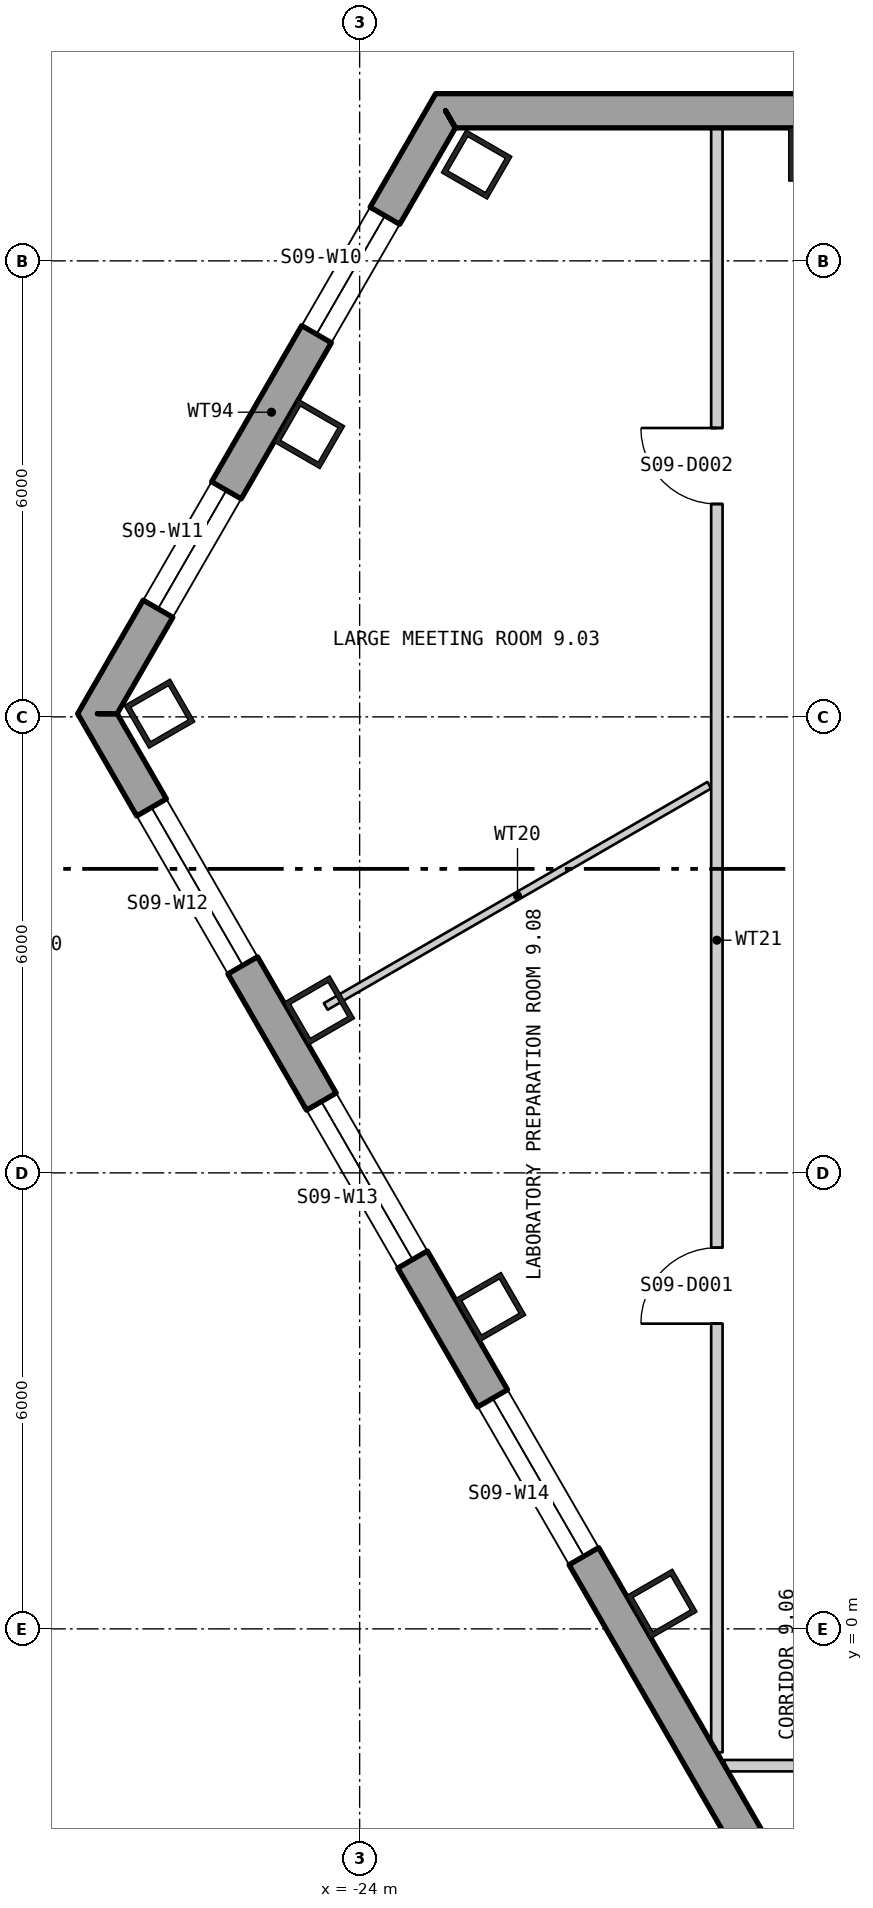
"""IFC4 building model, lengths in metres.
Left out: names, types, materials, properties, quantities, classifications, styles, units other than length and angle.
Written with IfcOpenShell. Run it as: python <this file> out.ifc"""

import sys

from ifc_helpers import new_model, si_unit, direction, frame, frame_2d, origin, origin_2d, place, context, subcontext, project, spatial, polyline, rectangle, hollow_rectangle, outline, extrude, element, fill, save


model = new_model("IFC4")
c1 = context("Model", 3, precision=1e-05, world=origin(), true_north=direction((0.0, 1.0)))
c2 = subcontext(c1, "Body", "Model", "MODEL_VIEW")
j1 = project(units=[si_unit("LENGTHUNIT", "METRE"), si_unit("PLANEANGLEUNIT", "RADIAN")], contexts=[c1])
p1 = place(None, origin())
s1 = spatial("IfcSite", under=j1, at=p1, CompositionType="ELEMENT")
p2 = place(p1, origin())
s2 = spatial("IfcBuilding", under=s1, at=p2, CompositionType="ELEMENT")
p3 = place(p2, frame((0.0, 0.0, 124.8)))
s3 = spatial("IfcBuildingStorey", under=s2, at=p3, CompositionType="ELEMENT", Elevation=124.8)
for number, where, z_axis, x_axis in (
    (1, (-18.03, 19.4, 0.0), (0.0, 0.0, 1.0), (-1.0, 0.0, 0.0)),
    (2, (-22.461, 19.267, 0.0), (0.0, 0.0, 1.0), (-0.5, -0.866, 0.0)),
    (3, (-24.662, 15.721, 0.0), (0.0, 0.0, 1.0), (-0.5, -0.866, 0.0)),
    (4, (-26.633, 12.042, 0.0), (0.0, 0.0, 1.0), (0.5, -0.866, 0.0)),
    (5, (-24.532, 8.138, 0.0), (0.0, 0.0, 1.0), (0.5, -0.866, 0.0)),
    (6, (-22.279, 4.235, 0.0), (0.0, 0.0, 1.0), (0.5, -0.866, 0.0)),
    (7, (-20.025, 0.331, 0.0), (0.0, 0.0, 1.0), (0.5, -0.866, 0.0)),
):
    element("IfcColumn", number, at=place(p3, frame(where, z_axis=z_axis, x_axis=x_axis)), inside=s3, PredefinedType="COLUMN", context=c2, shape_type="SweptSolid", body=[
        extrude(hollow_rectangle(XDim=0.65, YDim=0.7, WallThickness=0.065, at=origin_2d()), origin(), (0.0, 0.0, 1.0), 4.5),
    ])
p4 = place(p3, frame((22.87, 19.975, -0.4), z_axis=(0.0, 0.0, 1.0), x_axis=(-1.0, 0.0, 0.0)))
e8 = element("IfcWall", 8, at=p4, inside=s3, PredefinedType="SOLIDWALL", context=c2, shape_type="SweptSolid", body=[
    extrude(outline(polyline([(-0.13, -0.225), (45.87, -0.225), (45.61, 0.225), (0.13, 0.225), (-0.13, -0.225)])), origin(), (0.0, 0.0, 1.0), 4.5),
])
p5 = place(p4, frame((1.424, 0.0, 1.3)))
e9 = element("IfcOpeningElement", 9, at=p5, cuts=e8, PredefinedType="OPENING", context=c2, shape_type="SweptSolid", body=[
    extrude(rectangle(XDim=2.4, YDim=2.6, at=frame_2d((1.2, 1.3))), frame((0.0, 0.235, 0.0), z_axis=(0.0, -1.0, 0.0), x_axis=(1.0, 0.0, 0.0)), (0.0, 0.0, 1.0), 0.47),
])
p6 = place(p4, frame((5.893, 0.0, 1.3)))
e10 = element("IfcOpeningElement", 10, at=p6, cuts=e8, PredefinedType="OPENING", context=c2, shape_type="SweptSolid", body=[
    extrude(rectangle(XDim=2.4, YDim=2.6, at=frame_2d((1.2, 1.3))), frame((0.0, 0.235, 0.0), z_axis=(0.0, -1.0, 0.0), x_axis=(1.0, 0.0, 0.0)), (0.0, 0.0, 1.0), 0.47),
])
p7 = place(p4, frame((10.401, 0.0, 1.3)))
e11 = element("IfcOpeningElement", 11, at=p7, cuts=e8, PredefinedType="OPENING", context=c2, shape_type="SweptSolid", body=[
    extrude(rectangle(XDim=2.4, YDim=2.6, at=frame_2d((1.2, 1.3))), frame((0.0, 0.235, 0.0), z_axis=(0.0, -1.0, 0.0), x_axis=(1.0, 0.0, 0.0)), (0.0, 0.0, 1.0), 0.47),
])
p8 = place(p4, frame((14.909, 0.0, 1.3)))
e12 = element("IfcOpeningElement", 12, at=p8, cuts=e8, PredefinedType="OPENING", context=c2, shape_type="SweptSolid", body=[
    extrude(rectangle(XDim=2.4, YDim=2.6, at=frame_2d((1.2, 1.3))), frame((0.0, 0.235, 0.0), z_axis=(0.0, -1.0, 0.0), x_axis=(1.0, 0.0, 0.0)), (0.0, 0.0, 1.0), 0.47),
])
p9 = place(p4, frame((19.416, 0.0, 1.3)))
e13 = element("IfcOpeningElement", 13, at=p9, cuts=e8, PredefinedType="OPENING", context=c2, shape_type="SweptSolid", body=[
    extrude(rectangle(XDim=2.4, YDim=2.6, at=frame_2d((1.2, 1.3))), frame((0.0, 0.235, 0.0), z_axis=(0.0, -1.0, 0.0), x_axis=(1.0, 0.0, 0.0)), (0.0, 0.0, 1.0), 0.47),
])
p10 = place(p4, frame((23.924, 0.0, 1.3)))
e14 = element("IfcOpeningElement", 14, at=p10, cuts=e8, PredefinedType="OPENING", context=c2, shape_type="SweptSolid", body=[
    extrude(rectangle(XDim=2.4, YDim=2.6, at=frame_2d((1.2, 1.3))), frame((0.0, 0.235, 0.0), z_axis=(0.0, -1.0, 0.0), x_axis=(1.0, 0.0, 0.0)), (0.0, 0.0, 1.0), 0.47),
])
p11 = place(p4, frame((28.431, 0.0, 1.3)))
e15 = element("IfcOpeningElement", 15, at=p11, cuts=e8, PredefinedType="OPENING", context=c2, shape_type="SweptSolid", body=[
    extrude(rectangle(XDim=2.4, YDim=2.6, at=frame_2d((1.2, 1.3))), frame((0.0, 0.235, 0.0), z_axis=(0.0, -1.0, 0.0), x_axis=(1.0, 0.0, 0.0)), (0.0, 0.0, 1.0), 0.47),
])
p12 = place(p4, frame((32.939, 0.0, 1.3)))
e16 = element("IfcOpeningElement", 16, at=p12, cuts=e8, PredefinedType="OPENING", context=c2, shape_type="SweptSolid", body=[
    extrude(rectangle(XDim=2.4, YDim=2.6, at=frame_2d((1.2, 1.3))), frame((0.0, 0.235, 0.0), z_axis=(0.0, -1.0, 0.0), x_axis=(1.0, 0.0, 0.0)), (0.0, 0.0, 1.0), 0.47),
])
p13 = place(p4, frame((37.447, 0.0, 1.3)))
e17 = element("IfcOpeningElement", 17, at=p13, cuts=e8, PredefinedType="OPENING", context=c2, shape_type="SweptSolid", body=[
    extrude(rectangle(XDim=2.4, YDim=2.6, at=frame_2d((1.2, 1.3))), frame((0.0, 0.235, 0.0), z_axis=(0.0, -1.0, 0.0), x_axis=(1.0, 0.0, 0.0)), (0.0, 0.0, 1.0), 0.47),
])
p14 = place(p3, frame((-22.87, 19.975, -0.4), z_axis=(0.0, 0.0, 1.0), x_axis=(-0.499998388237, -0.866026334334, 0.0)))
e18 = element("IfcWall", 18, at=p14, inside=s3, PredefinedType="SOLIDWALL", context=c2, shape_type="SweptSolid", body=[
    extrude(outline(polyline([(-0.13, -0.225), (9.29, -0.225), (9.03, 0.225), (0.13, 0.225), (-0.13, -0.225)])), origin(), (0.0, 0.0, 1.0), 4.5),
])
p15 = place(p14, frame((1.594, 0.0, 1.3)))
e19 = element("IfcOpeningElement", 19, at=p15, cuts=e18, PredefinedType="OPENING", context=c2, shape_type="SweptSolid", body=[
    extrude(rectangle(XDim=1.8, YDim=2.6, at=frame_2d((0.9, 1.3))), frame((0.0, 0.235, 0.0), z_axis=(0.0, -1.0, 0.0), x_axis=(1.0, 0.0, 0.0)), (0.0, 0.0, 1.0), 0.47),
])
p16 = place(p14, frame((5.766, 0.0, 1.3)))
e20 = element("IfcOpeningElement", 20, at=p16, cuts=e18, PredefinedType="OPENING", context=c2, shape_type="SweptSolid", body=[
    extrude(rectangle(XDim=1.8, YDim=2.6, at=frame_2d((0.9, 1.3))), frame((0.0, 0.235, 0.0), z_axis=(0.0, -1.0, 0.0), x_axis=(1.0, 0.0, 0.0)), (0.0, 0.0, 1.0), 0.47),
])
p17 = place(p3, frame((-27.45, 12.042, -0.18), z_axis=(0.0, 0.0, 1.0), x_axis=(0.500000711659, -0.866024992908, 0.0)))
e21 = element("IfcWall", 21, at=p17, inside=s3, PredefinedType="SOLIDWALL", context=c2, shape_type="SweptSolid", body=[
    extrude(outline(polyline([(-0.13, -0.225), (45.87, -0.225), (45.61, 0.225), (0.13, 0.225), (-0.13, -0.225)])), origin(), (0.0, 0.0, 1.0), 4.28),
])
p18 = place(p17, frame((1.424, 0.0, 1.08)))
e22 = element("IfcOpeningElement", 22, at=p18, cuts=e21, PredefinedType="OPENING", context=c2, shape_type="SweptSolid", body=[
    extrude(rectangle(XDim=2.4, YDim=2.6, at=frame_2d((1.2, 1.3))), frame((0.0, 0.235, 0.0), z_axis=(0.0, -1.0, 0.0), x_axis=(1.0, 0.0, 0.0)), (0.0, 0.0, 1.0), 0.47),
])
p19 = place(p17, frame((5.893, 0.0, 1.08)))
e23 = element("IfcOpeningElement", 23, at=p19, cuts=e21, PredefinedType="OPENING", context=c2, shape_type="SweptSolid", body=[
    extrude(rectangle(XDim=2.4, YDim=2.6, at=frame_2d((1.2, 1.3))), frame((0.0, 0.235, 0.0), z_axis=(0.0, -1.0, 0.0), x_axis=(1.0, 0.0, 0.0)), (0.0, 0.0, 1.0), 0.47),
])
p20 = place(p17, frame((10.401, 0.0, 1.08)))
e24 = element("IfcOpeningElement", 24, at=p20, cuts=e21, PredefinedType="OPENING", context=c2, shape_type="SweptSolid", body=[
    extrude(rectangle(XDim=2.4, YDim=2.6, at=frame_2d((1.2, 1.3))), frame((0.0, 0.235, 0.0), z_axis=(0.0, -1.0, 0.0), x_axis=(1.0, 0.0, 0.0)), (0.0, 0.0, 1.0), 0.47),
])
p21 = place(p17, frame((19.416, 0.0, 1.08)))
e25 = element("IfcOpeningElement", 25, at=p21, cuts=e21, PredefinedType="OPENING", context=c2, shape_type="SweptSolid", body=[
    extrude(rectangle(XDim=2.4, YDim=2.6, at=frame_2d((1.2, 1.3))), frame((0.0, 0.235, 0.0), z_axis=(0.0, -1.0, 0.0), x_axis=(1.0, 0.0, 0.0)), (0.0, 0.0, 1.0), 0.47),
])
p22 = place(p17, frame((23.924, 0.0, 1.08)))
e26 = element("IfcOpeningElement", 26, at=p22, cuts=e21, PredefinedType="OPENING", context=c2, shape_type="SweptSolid", body=[
    extrude(rectangle(XDim=2.4, YDim=2.6, at=frame_2d((1.2, 1.3))), frame((0.0, 0.235, 0.0), z_axis=(0.0, -1.0, 0.0), x_axis=(1.0, 0.0, 0.0)), (0.0, 0.0, 1.0), 0.47),
])
p23 = place(p17, frame((28.431, 0.0, 1.08)))
e27 = element("IfcOpeningElement", 27, at=p23, cuts=e21, PredefinedType="OPENING", context=c2, shape_type="SweptSolid", body=[
    extrude(rectangle(XDim=2.4, YDim=2.6, at=frame_2d((1.2, 1.3))), frame((0.0, 0.235, 0.0), z_axis=(0.0, -1.0, 0.0), x_axis=(1.0, 0.0, 0.0)), (0.0, 0.0, 1.0), 0.47),
])
p24 = place(p17, frame((32.939, 0.0, 1.08)))
e28 = element("IfcOpeningElement", 28, at=p24, cuts=e21, PredefinedType="OPENING", context=c2, shape_type="SweptSolid", body=[
    extrude(rectangle(XDim=2.4, YDim=2.6, at=frame_2d((1.2, 1.3))), frame((0.0, 0.235, 0.0), z_axis=(0.0, -1.0, 0.0), x_axis=(1.0, 0.0, 0.0)), (0.0, 0.0, 1.0), 0.47),
])
p25 = place(p17, frame((37.447, 0.0, 1.08)))
e29 = element("IfcOpeningElement", 29, at=p25, cuts=e21, PredefinedType="OPENING", context=c2, shape_type="SweptSolid", body=[
    extrude(rectangle(XDim=2.4, YDim=2.6, at=frame_2d((1.2, 1.3))), frame((0.0, 0.235, 0.0), z_axis=(0.0, -1.0, 0.0), x_axis=(1.0, 0.0, 0.0)), (0.0, 0.0, 1.0), 0.47),
])
p26 = place(p17, frame((41.916, 0.0, 1.08)))
e30 = element("IfcOpeningElement", 30, at=p26, cuts=e21, PredefinedType="OPENING", context=c2, shape_type="SweptSolid", body=[
    extrude(rectangle(XDim=2.4, YDim=2.6, at=frame_2d((1.2, 1.3))), frame((0.0, 0.235, 0.0), z_axis=(0.0, -1.0, 0.0), x_axis=(1.0, 0.0, 0.0)), (0.0, 0.0, 1.0), 0.47),
])
p27 = place(p3, frame((-24.446, 8.189, 0.0), z_axis=(0.0, 0.0, 1.0), x_axis=(0.866122712398, 0.499831418649, 0.0)))
e31 = element("IfcWall", 31, at=p27, inside=s3, PredefinedType="PARTITIONING", context=c2, shape_type="SweptSolid", body=[
    extrude(rectangle(XDim=5.826, YDim=0.1, at=frame_2d((2.913, 0.0))), origin(), (0.0, 0.0, 1.0), 4.3),
])
p28 = place(p3, frame((-19.3, -1.624, 0.0), z_axis=(0.0, 0.0, 1.0), x_axis=(0.0, 1.0, 0.0)))
e32 = element("IfcWall", 32, at=p28, inside=s3, PredefinedType="PARTITIONING", context=c2, shape_type="SweptSolid", body=[
    extrude(rectangle(XDim=21.371, YDim=0.15, at=frame_2d((10.685, 0.0))), origin(), (0.0, 0.0, 1.0), 4.3),
])
p29 = place(p28, frame((5.64, 0.0, 0.0)))
e33 = element("IfcOpeningElement", 33, at=p29, cuts=e32, PredefinedType="OPENING", context=c2, shape_type="SweptSolid", body=[
    extrude(rectangle(XDim=1.0, YDim=2.1, at=frame_2d((0.5, 1.05))), frame((0.0, 0.085, 0.0), z_axis=(0.0, -1.0, 0.0), x_axis=(1.0, 0.0, 0.0)), (0.0, 0.0, 1.0), 0.17),
])
p30 = place(p28, frame((16.425, 0.0, 0.0)))
e34 = element("IfcOpeningElement", 34, at=p30, cuts=e32, PredefinedType="OPENING", context=c2, shape_type="SweptSolid", body=[
    extrude(rectangle(XDim=1.0, YDim=2.1, at=frame_2d((0.5, 1.05))), frame((0.0, 0.085, 0.0), z_axis=(0.0, -1.0, 0.0), x_axis=(1.0, 0.0, 0.0)), (0.0, 0.0, 1.0), 0.17),
])
p31 = place(p3, frame((-19.198, -1.8, 0.0), z_axis=(0.0, 0.0, 1.0), x_axis=(1.0, 0.0, 0.0)))
e35 = element("IfcWall", 35, at=p31, inside=s3, PredefinedType="PARTITIONING", context=c2, shape_type="SweptSolid", body=[
    extrude(rectangle(XDim=11.838, YDim=0.15, at=frame_2d((5.919, 0.0))), origin(), (0.0, 0.0, 1.0), 4.3),
])
p32 = place(p15, origin())
e36 = element("IfcWindow", 36, at=p32, inside=s3, PartitioningType="SINGLE_PANEL", PredefinedType="WINDOW", context=c2, shape_type="SweptSolid", body=[
    extrude(rectangle(XDim=1.8, YDim=2.6, at=frame_2d((0.9, 1.3))), frame((0.0, 0.105, 0.0), z_axis=(0.0, -1.0, 0.0), x_axis=(1.0, 0.0, 0.0)), (0.0, 0.0, 1.0), 0.06),
])
fill(e19, e36)
p33 = place(p16, origin())
e37 = element("IfcWindow", 37, at=p33, inside=s3, PartitioningType="SINGLE_PANEL", PredefinedType="WINDOW", context=c2, shape_type="SweptSolid", body=[
    extrude(rectangle(XDim=1.8, YDim=2.6, at=frame_2d((0.9, 1.3))), frame((0.0, 0.105, 0.0), z_axis=(0.0, -1.0, 0.0), x_axis=(1.0, 0.0, 0.0)), (0.0, 0.0, 1.0), 0.06),
])
fill(e20, e37)
p34 = place(p18, origin())
e38 = element("IfcWindow", 38, at=p34, inside=s3, PartitioningType="SINGLE_PANEL", PredefinedType="WINDOW", context=c2, shape_type="SweptSolid", body=[
    extrude(rectangle(XDim=2.4, YDim=2.6, at=frame_2d((1.2, 1.3))), frame((0.0, 0.105, 0.0), z_axis=(0.0, -1.0, 0.0), x_axis=(1.0, 0.0, 0.0)), (0.0, 0.0, 1.0), 0.06),
])
fill(e22, e38)
p35 = place(p19, origin())
e39 = element("IfcWindow", 39, at=p35, inside=s3, PartitioningType="SINGLE_PANEL", PredefinedType="WINDOW", context=c2, shape_type="SweptSolid", body=[
    extrude(rectangle(XDim=2.4, YDim=2.6, at=frame_2d((1.2, 1.3))), frame((0.0, 0.105, 0.0), z_axis=(0.0, -1.0, 0.0), x_axis=(1.0, 0.0, 0.0)), (0.0, 0.0, 1.0), 0.06),
])
fill(e23, e39)
p36 = place(p20, origin())
e40 = element("IfcWindow", 40, at=p36, inside=s3, PartitioningType="SINGLE_PANEL", PredefinedType="WINDOW", context=c2, shape_type="SweptSolid", body=[
    extrude(rectangle(XDim=2.4, YDim=2.6, at=frame_2d((1.2, 1.3))), frame((0.0, 0.105, 0.0), z_axis=(0.0, -1.0, 0.0), x_axis=(1.0, 0.0, 0.0)), (0.0, 0.0, 1.0), 0.06),
])
fill(e24, e40)
p37 = place(p29, origin())
e41 = element("IfcDoor", 41, at=p37, inside=s3, OperationType="SINGLE_SWING_RIGHT", PredefinedType="DOOR", context=c2, shape_type="SweptSolid", body=[
    extrude(rectangle(XDim=1.0, YDim=2.1, at=frame_2d((0.5, 1.05))), frame((0.0, 0.025, 0.0), z_axis=(0.0, -1.0, 0.0), x_axis=(1.0, 0.0, 0.0)), (0.0, 0.0, 1.0), 0.05),
])
fill(e33, e41)
p38 = place(p30, origin())
e42 = element("IfcDoor", 42, at=p38, inside=s3, OperationType="SINGLE_SWING_LEFT", PredefinedType="DOOR", context=c2, shape_type="SweptSolid", body=[
    extrude(rectangle(XDim=1.0, YDim=2.1, at=frame_2d((0.5, 1.05))), frame((0.0, 0.025, 0.0), z_axis=(0.0, -1.0, 0.0), x_axis=(1.0, 0.0, 0.0)), (0.0, 0.0, 1.0), 0.05),
])
fill(e34, e42)
save(model, sys.argv[1])
